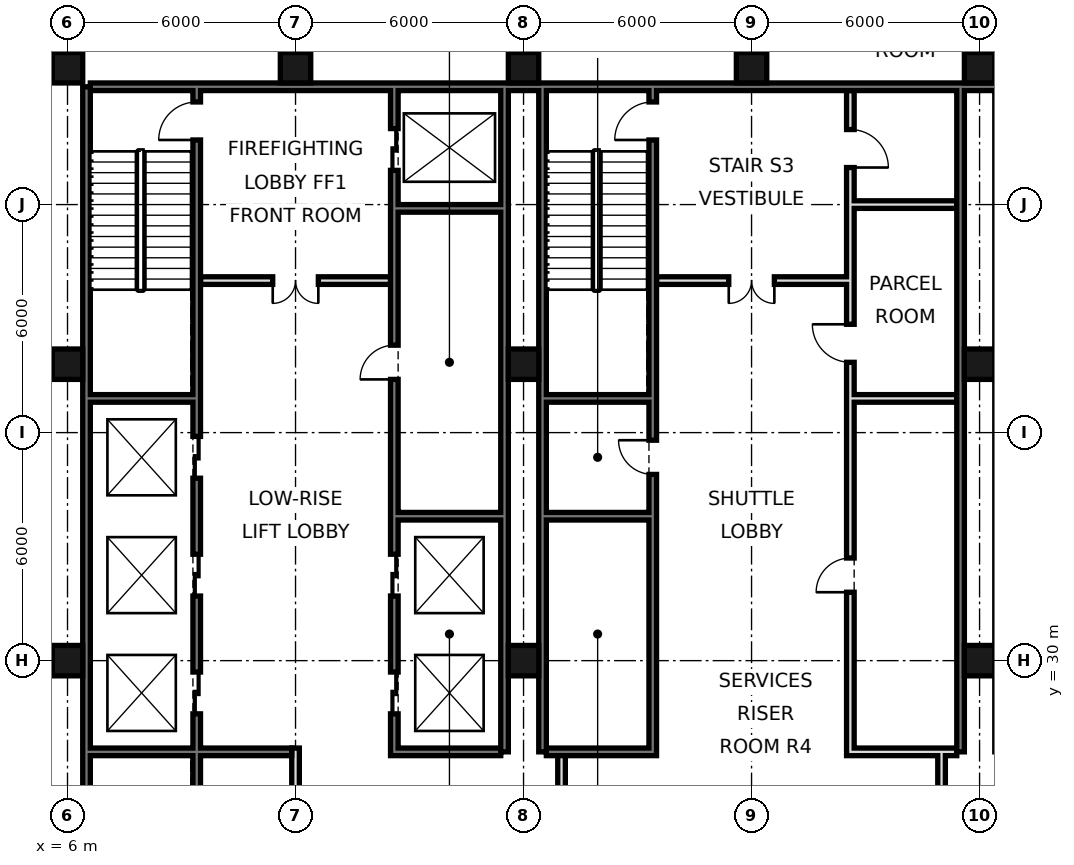
"""IFC4 building model, lengths in metres.
Left out: names, types, materials, properties, quantities, classifications, styles, units other than length and angle.
Written with IfcOpenShell. Run it as: python <this file> out.ifc"""

import sys

from ifc_helpers import new_model, si_unit, direction, frame, frame_2d, origin, origin_2d, place, context, subcontext, project, spatial, rectangle, hollow_rectangle, extrude, element, fill, save


model = new_model("IFC4")
c1 = context("Model", 3, precision=1e-05, world=origin(), true_north=direction((0.0, 1.0)))
c2 = subcontext(c1, "Body", "Model", "MODEL_VIEW")
j1 = project(units=[si_unit("LENGTHUNIT", "METRE"), si_unit("PLANEANGLEUNIT", "RADIAN")], contexts=[c1])
p1 = place(None, origin())
s1 = spatial("IfcSite", under=j1, at=p1, CompositionType="ELEMENT")
p2 = place(p1, origin())
s2 = spatial("IfcBuilding", under=s1, at=p2, CompositionType="ELEMENT")
p3 = place(p2, frame((0.0, 0.0, 20.4)))
s3 = spatial("IfcBuildingStorey", under=s2, at=p3, CompositionType="ELEMENT", Elevation=20.4)
for number, where, z_axis, x_axis in (
    (1, (6.0, 30.0, 0.0), (0.0, 0.0, 1.0), (1.0, 0.0, 0.0)),
    (2, (6.0, 37.8, 0.0), (0.0, 0.0, 1.0), (1.0, 0.0, 0.0)),
    (3, (6.0, 45.6, 0.0), (0.0, 0.0, 1.0), (1.0, 0.0, 0.0)),
    (4, (12.0, 45.6, 0.0), (0.0, 0.0, 1.0), (1.0, 0.0, 0.0)),
    (5, (18.0, 30.0, 0.0), (0.0, 0.0, 1.0), (1.0, 0.0, 0.0)),
    (6, (18.0, 37.8, 0.0), (0.0, 0.0, 1.0), (1.0, 0.0, 0.0)),
    (7, (18.0, 45.6, 0.0), (0.0, 0.0, 1.0), (1.0, 0.0, 0.0)),
    (8, (24.0, 45.6, 0.0), (0.0, 0.0, 1.0), (1.0, 0.0, 0.0)),
    (9, (30.0, 30.0, 0.0), (0.0, 0.0, 1.0), (1.0, 0.0, 0.0)),
    (10, (30.0, 37.8, 0.0), (0.0, 0.0, 1.0), (1.0, 0.0, 0.0)),
    (11, (30.0, 45.6, 0.0), (0.0, 0.0, 1.0), (1.0, 0.0, 0.0)),
):
    element("IfcColumn", number, at=place(p3, frame(where, z_axis=z_axis, x_axis=x_axis)), inside=s3, PredefinedType="COLUMN", context=c2, shape_type="SweptSolid", body=[
        extrude(hollow_rectangle(XDim=0.8, YDim=0.8, WallThickness=0.07, at=origin_2d()), origin(), (0.0, 0.0, 1.0), 4.8),
    ])
p4 = place(p3, frame((6.5, 21.6, 0.0), z_axis=(0.0, 0.0, 1.0), x_axis=(0.0, 1.0, 0.0)))
e12 = element("IfcWall", 12, at=p4, inside=s3, PredefinedType="SOLIDWALL", context=c2, shape_type="SweptSolid", body=[
    extrude(rectangle(XDim=23.5, YDim=0.2, at=frame_2d((11.75, 0.0))), origin(), (0.0, 0.0, 1.0), 4.4),
])
p5 = place(p3, frame((6.6, 45.1, 0.0), z_axis=(0.0, 0.0, 1.0), x_axis=(1.0, 0.0, 0.0)))
e13 = element("IfcWall", 13, at=p5, inside=s3, PredefinedType="SOLIDWALL", context=c2, shape_type="SweptSolid", body=[
    extrude(rectangle(XDim=34.8, YDim=0.2, at=frame_2d((17.4, 0.0))), origin(), (0.0, 0.0, 1.0), 4.4),
])
for number, where, z_axis, x_axis in (
    (14, (17.5, 27.6, 0.0), (0.0, 0.0, 1.0), (0.0, 1.0, 0.0)),
    (15, (18.5, 27.6, 0.0), (0.0, 0.0, 1.0), (0.0, 1.0, 0.0)),
    (16, (29.5, 27.6, 0.0), (0.0, 0.0, 1.0), (0.0, 1.0, 0.0)),
):
    element("IfcWall", number, at=place(p3, frame(where, z_axis=z_axis, x_axis=x_axis)), inside=s3, PredefinedType="SOLIDWALL", context=c2, shape_type="SweptSolid", body=[
        extrude(rectangle(XDim=17.5, YDim=0.2, at=frame_2d((8.75, 0.0))), origin(), (0.0, 0.0, 1.0), 4.4),
    ])
p6 = place(p3, frame((19.0, 21.6, 0.0), z_axis=(0.0, 0.0, 1.0), x_axis=(0.0, 1.0, 0.0)))
e17 = element("IfcWall", 17, at=p6, inside=s3, PredefinedType="PARTITIONING", context=c2, shape_type="SweptSolid", body=[
    extrude(rectangle(XDim=6.0, YDim=0.2, at=frame_2d((3.0, 0.0))), origin(), (0.0, 0.0, 1.0), 4.4),
])
p7 = place(p6, frame((2.1, 0.0, 0.0)))
e18 = element("IfcOpeningElement", 18, at=p7, cuts=e17, PredefinedType="OPENING", context=c2, shape_type="SweptSolid", body=[
    extrude(rectangle(XDim=1.8, YDim=2.1, at=frame_2d((0.9, 1.05))), frame((0.0, 0.11, 0.0), z_axis=(0.0, -1.0, 0.0), x_axis=(1.0, 0.0, 0.0)), (0.0, 0.0, 1.0), 0.22),
])
p8 = place(p3, frame((29.0, 21.6, 0.0), z_axis=(0.0, 0.0, 1.0), x_axis=(0.0, 1.0, 0.0)))
e19 = element("IfcWall", 19, at=p8, inside=s3, PredefinedType="PARTITIONING", context=c2, shape_type="SweptSolid", body=[
    extrude(rectangle(XDim=6.0, YDim=0.2, at=frame_2d((3.0, 0.0))), origin(), (0.0, 0.0, 1.0), 4.4),
])
p9 = place(p8, frame((2.1, 0.0, 0.0)))
e20 = element("IfcOpeningElement", 20, at=p9, cuts=e19, PredefinedType="OPENING", context=c2, shape_type="SweptSolid", body=[
    extrude(rectangle(XDim=1.8, YDim=2.1, at=frame_2d((0.9, 1.05))), frame((0.0, 0.11, 0.0), z_axis=(0.0, -1.0, 0.0), x_axis=(1.0, 0.0, 0.0)), (0.0, 0.0, 1.0), 0.22),
])
p10 = place(p3, frame((12.0, 21.6, 0.0), z_axis=(0.0, 0.0, 1.0), x_axis=(0.0, 1.0, 0.0)))
e21 = element("IfcWall", 21, at=p10, inside=s3, PredefinedType="PARTITIONING", context=c2, shape_type="SweptSolid", body=[
    extrude(rectangle(XDim=6.1, YDim=0.2, at=frame_2d((3.05, 0.0))), origin(), (0.0, 0.0, 1.0), 4.4),
])
p11 = place(p3, frame((14.6, 27.5, 0.0), z_axis=(0.0, 0.0, 1.0), x_axis=(0.0, 1.0, 0.0)))
e22 = element("IfcWall", 22, at=p11, inside=s3, PredefinedType="SOLIDWALL", context=c2, shape_type="SweptSolid", body=[
    extrude(rectangle(XDim=17.5, YDim=0.2, at=frame_2d((8.75, 0.0))), origin(), (0.0, 0.0, 1.0), 4.4),
])
p12 = place(p11, frame((1.1, 0.0, 0.0)))
e23 = element("IfcOpeningElement", 23, at=p12, cuts=e22, PredefinedType="OPENING", context=c2, shape_type="SweptSolid", body=[
    extrude(rectangle(XDim=1.1, YDim=2.1, at=frame_2d((0.55, 1.05))), frame((0.0, 0.11, 0.0), z_axis=(0.0, -1.0, 0.0), x_axis=(1.0, 0.0, 0.0)), (0.0, 0.0, 1.0), 0.22),
])
p13 = place(p11, frame((4.2, 0.0, 0.0)))
e24 = element("IfcOpeningElement", 24, at=p13, cuts=e22, PredefinedType="OPENING", context=c2, shape_type="SweptSolid", body=[
    extrude(rectangle(XDim=1.1, YDim=2.1, at=frame_2d((0.55, 1.05))), frame((0.0, 0.11, 0.0), z_axis=(0.0, -1.0, 0.0), x_axis=(1.0, 0.0, 0.0)), (0.0, 0.0, 1.0), 0.22),
])
p14 = place(p11, frame((15.4, 0.0, 0.0)))
e25 = element("IfcOpeningElement", 25, at=p14, cuts=e22, PredefinedType="OPENING", context=c2, shape_type="SweptSolid", body=[
    extrude(rectangle(XDim=1.1, YDim=2.1, at=frame_2d((0.55, 1.05))), frame((0.0, 0.11, 0.0), z_axis=(0.0, -1.0, 0.0), x_axis=(1.0, 0.0, 0.0)), (0.0, 0.0, 1.0), 0.22),
])
p15 = place(p11, frame((9.9, 0.0, 0.0)))
e26 = element("IfcOpeningElement", 26, at=p15, cuts=e22, PredefinedType="OPENING", context=c2, shape_type="SweptSolid", body=[
    extrude(rectangle(XDim=0.9, YDim=2.1, at=frame_2d((0.45, 1.05))), frame((0.0, 0.11, 0.0), z_axis=(0.0, -1.0, 0.0), x_axis=(1.0, 0.0, 0.0)), (0.0, 0.0, 1.0), 0.22),
])
p16 = place(p3, frame((21.4, 27.5, 0.0), z_axis=(0.0, 0.0, 1.0), x_axis=(0.0, 1.0, 0.0)))
e27 = element("IfcWall", 27, at=p16, inside=s3, PredefinedType="SOLIDWALL", context=c2, shape_type="SweptSolid", body=[
    extrude(rectangle(XDim=17.5, YDim=0.2, at=frame_2d((8.75, 0.0))), origin(), (0.0, 0.0, 1.0), 4.4),
])
p17 = place(p16, frame((16.2, 0.0, 0.0)))
e28 = element("IfcOpeningElement", 28, at=p17, cuts=e27, PredefinedType="OPENING", context=c2, shape_type="SweptSolid", body=[
    extrude(rectangle(XDim=1.0, YDim=2.1, at=frame_2d((0.5, 1.05))), frame((0.0, 0.11, 0.0), z_axis=(0.0, -1.0, 0.0), x_axis=(1.0, 0.0, 0.0)), (0.0, 0.0, 1.0), 0.22),
])
p18 = place(p16, frame((7.4, 0.0, 0.0)))
e29 = element("IfcOpeningElement", 29, at=p18, cuts=e27, PredefinedType="OPENING", context=c2, shape_type="SweptSolid", body=[
    extrude(rectangle(XDim=0.9, YDim=2.1, at=frame_2d((0.45, 1.05))), frame((0.0, 0.11, 0.0), z_axis=(0.0, -1.0, 0.0), x_axis=(1.0, 0.0, 0.0)), (0.0, 0.0, 1.0), 0.22),
])
p19 = place(p3, frame((26.6, 27.5, 0.0), z_axis=(0.0, 0.0, 1.0), x_axis=(0.0, 1.0, 0.0)))
e30 = element("IfcWall", 30, at=p19, inside=s3, PredefinedType="SOLIDWALL", context=c2, shape_type="SweptSolid", body=[
    extrude(rectangle(XDim=17.5, YDim=0.2, at=frame_2d((8.75, 0.0))), origin(), (0.0, 0.0, 1.0), 4.4),
])
p20 = place(p19, frame((4.3, 0.0, 0.0)))
e31 = element("IfcOpeningElement", 31, at=p20, cuts=e30, PredefinedType="OPENING", context=c2, shape_type="SweptSolid", body=[
    extrude(rectangle(XDim=0.9, YDim=2.1, at=frame_2d((0.45, 1.05))), frame((0.0, 0.11, 0.0), z_axis=(0.0, -1.0, 0.0), x_axis=(1.0, 0.0, 0.0)), (0.0, 0.0, 1.0), 0.22),
])
p21 = place(p19, frame((10.35, 0.0, 0.0)))
e32 = element("IfcOpeningElement", 32, at=p21, cuts=e30, PredefinedType="OPENING", context=c2, shape_type="SweptSolid", body=[
    extrude(rectangle(XDim=1.0, YDim=2.1, at=frame_2d((0.5, 1.05))), frame((0.0, 0.11, 0.0), z_axis=(0.0, -1.0, 0.0), x_axis=(1.0, 0.0, 0.0)), (0.0, 0.0, 1.0), 0.22),
])
p22 = place(p19, frame((15.475, 0.0, 0.0)))
e33 = element("IfcOpeningElement", 33, at=p22, cuts=e30, PredefinedType="OPENING", context=c2, shape_type="SweptSolid", body=[
    extrude(rectangle(XDim=1.0, YDim=2.1, at=frame_2d((0.5, 1.05))), frame((0.0, 0.11, 0.0), z_axis=(0.0, -1.0, 0.0), x_axis=(1.0, 0.0, 0.0)), (0.0, 0.0, 1.0), 0.22),
])
p23 = place(p3, frame((9.4, 21.6, 0.0), z_axis=(0.0, 0.0, 1.0), x_axis=(0.0, 1.0, 0.0)))
e34 = element("IfcWall", 34, at=p23, inside=s3, PredefinedType="SOLIDWALL", context=c2, shape_type="SweptSolid", body=[
    extrude(rectangle(XDim=23.4, YDim=0.2, at=frame_2d((11.7, 0.0))), origin(), (0.0, 0.0, 1.0), 4.4),
])
p24 = place(p23, frame((7.0, 0.0, 0.0)))
e35 = element("IfcOpeningElement", 35, at=p24, cuts=e34, PredefinedType="OPENING", context=c2, shape_type="SweptSolid", body=[
    extrude(rectangle(XDim=1.1, YDim=2.1, at=frame_2d((0.55, 1.05))), frame((0.0, 0.11, 0.0), z_axis=(0.0, -1.0, 0.0), x_axis=(1.0, 0.0, 0.0)), (0.0, 0.0, 1.0), 0.22),
])
p25 = place(p23, frame((10.1, 0.0, 0.0)))
e36 = element("IfcOpeningElement", 36, at=p25, cuts=e34, PredefinedType="OPENING", context=c2, shape_type="SweptSolid", body=[
    extrude(rectangle(XDim=1.1, YDim=2.1, at=frame_2d((0.55, 1.05))), frame((0.0, 0.11, 0.0), z_axis=(0.0, -1.0, 0.0), x_axis=(1.0, 0.0, 0.0)), (0.0, 0.0, 1.0), 0.22),
])
p26 = place(p23, frame((13.2, 0.0, 0.0)))
e37 = element("IfcOpeningElement", 37, at=p26, cuts=e34, PredefinedType="OPENING", context=c2, shape_type="SweptSolid", body=[
    extrude(rectangle(XDim=1.1, YDim=2.1, at=frame_2d((0.55, 1.05))), frame((0.0, 0.11, 0.0), z_axis=(0.0, -1.0, 0.0), x_axis=(1.0, 0.0, 0.0)), (0.0, 0.0, 1.0), 0.22),
])
p27 = place(p23, frame((22.1, 0.0, 0.0)))
e38 = element("IfcOpeningElement", 38, at=p27, cuts=e34, PredefinedType="OPENING", context=c2, shape_type="SweptSolid", body=[
    extrude(rectangle(XDim=1.0, YDim=2.1, at=frame_2d((0.5, 1.05))), frame((0.0, 0.11, 0.0), z_axis=(0.0, -1.0, 0.0), x_axis=(1.0, 0.0, 0.0)), (0.0, 0.0, 1.0), 0.22),
])
p28 = place(p23, frame((0.175, 0.0, 0.0)))
e39 = element("IfcOpeningElement", 39, at=p28, cuts=e34, PredefinedType="OPENING", context=c2, shape_type="SweptSolid", body=[
    extrude(rectangle(XDim=0.9, YDim=2.1, at=frame_2d((0.45, 1.05))), frame((0.0, 0.11, 0.0), z_axis=(0.0, -1.0, 0.0), x_axis=(1.0, 0.0, 0.0)), (0.0, 0.0, 1.0), 0.22),
])
for number, where, z_axis, x_axis in (
    (40, (14.7, 27.6, 0.0), (0.0, 0.0, 1.0), (1.0, 0.0, 0.0)),
    (41, (18.6, 27.6, 0.0), (0.0, 0.0, 1.0), (1.0, 0.0, 0.0)),
    (42, (26.7, 27.6, 0.0), (0.0, 0.0, 1.0), (1.0, 0.0, 0.0)),
):
    element("IfcWall", number, at=place(p3, frame(where, z_axis=z_axis, x_axis=x_axis)), inside=s3, PredefinedType="SOLIDWALL", context=c2, shape_type="SweptSolid", body=[
        extrude(rectangle(XDim=2.7, YDim=0.2, at=frame_2d((1.35, 0.0))), origin(), (0.0, 0.0, 1.0), 4.4),
    ])
p29 = place(p3, frame((6.6, 27.6, 0.0), z_axis=(0.0, 0.0, 1.0), x_axis=(1.0, 0.0, 0.0)))
e43 = element("IfcWall", 43, at=p29, inside=s3, PredefinedType="SOLIDWALL", context=c2, shape_type="SweptSolid", body=[
    extrude(rectangle(XDim=5.3, YDim=0.2, at=frame_2d((2.65, 0.0))), origin(), (0.0, 0.0, 1.0), 4.4),
])
for number, where, z_axis, x_axis in (
    (44, (14.7, 33.8, 0.0), (0.0, 0.0, 1.0), (1.0, 0.0, 0.0)),
    (45, (18.6, 33.8, 0.0), (0.0, 0.0, 1.0), (1.0, 0.0, 0.0)),
    (46, (18.6, 36.9, 0.0), (0.0, 0.0, 1.0), (1.0, 0.0, 0.0)),
    (47, (26.7, 36.9, 0.0), (0.0, 0.0, 1.0), (1.0, 0.0, 0.0)),
    (48, (6.6, 36.9, 0.0), (0.0, 0.0, 1.0), (1.0, 0.0, 0.0)),
):
    element("IfcWall", number, at=place(p3, frame(where, z_axis=z_axis, x_axis=x_axis)), inside=s3, PredefinedType="SOLIDWALL", context=c2, shape_type="SweptSolid", body=[
        extrude(rectangle(XDim=2.7, YDim=0.2, at=frame_2d((1.35, 0.0))), origin(), (0.0, 0.0, 1.0), 4.4),
    ])
p30 = place(p3, frame((21.5, 40.0, 0.0), z_axis=(0.0, 0.0, 1.0), x_axis=(1.0, 0.0, 0.0)))
e49 = element("IfcWall", 49, at=p30, inside=s3, PredefinedType="PARTITIONING", context=c2, shape_type="SweptSolid", body=[
    extrude(rectangle(XDim=5.0, YDim=0.2, at=frame_2d((2.5, 0.0))), origin(), (0.0, 0.0, 1.0), 4.4),
])
p31 = place(p30, frame((1.9, 0.0, 0.0)))
e50 = element("IfcOpeningElement", 50, at=p31, cuts=e49, PredefinedType="OPENING", context=c2, shape_type="SweptSolid", body=[
    extrude(rectangle(XDim=1.2, YDim=2.1, at=frame_2d((0.6, 1.05))), frame((0.0, 0.11, 0.0), z_axis=(0.0, -1.0, 0.0), x_axis=(1.0, 0.0, 0.0)), (0.0, 0.0, 1.0), 0.22),
])
p32 = place(p3, frame((9.5, 40.0, 0.0), z_axis=(0.0, 0.0, 1.0), x_axis=(1.0, 0.0, 0.0)))
e51 = element("IfcWall", 51, at=p32, inside=s3, PredefinedType="PARTITIONING", context=c2, shape_type="SweptSolid", body=[
    extrude(rectangle(XDim=5.0, YDim=0.2, at=frame_2d((2.5, 0.0))), origin(), (0.0, 0.0, 1.0), 4.4),
])
p33 = place(p32, frame((1.9, 0.0, 0.0)))
e52 = element("IfcOpeningElement", 52, at=p33, cuts=e51, PredefinedType="OPENING", context=c2, shape_type="SweptSolid", body=[
    extrude(rectangle(XDim=1.2, YDim=2.1, at=frame_2d((0.6, 1.05))), frame((0.0, 0.11, 0.0), z_axis=(0.0, -1.0, 0.0), x_axis=(1.0, 0.0, 0.0)), (0.0, 0.0, 1.0), 0.22),
])
p34 = place(p3, frame((14.7, 41.9, 0.0), z_axis=(0.0, 0.0, 1.0), x_axis=(1.0, 0.0, 0.0)))
e53 = element("IfcWall", 53, at=p34, inside=s3, PredefinedType="SOLIDWALL", context=c2, shape_type="SweptSolid", body=[
    extrude(rectangle(XDim=2.7, YDim=0.2, at=frame_2d((1.35, 0.0))), origin(), (0.0, 0.0, 1.0), 4.4),
])
p35 = place(p3, frame((26.7, 42.0, 0.0), z_axis=(0.0, 0.0, 1.0), x_axis=(1.0, 0.0, 0.0)))
e54 = element("IfcWall", 54, at=p35, inside=s3, PredefinedType="PARTITIONING", context=c2, shape_type="SweptSolid", body=[
    extrude(rectangle(XDim=2.7, YDim=0.2, at=frame_2d((1.35, 0.0))), origin(), (0.0, 0.0, 1.0), 4.4),
])
p36 = place(p33, frame((1.2, 0.0, 0.0), z_axis=(0.0, 0.0, 1.0), x_axis=(-1.0, 0.0, 0.0)))
e55 = element("IfcDoor", 55, at=p36, inside=s3, OperationType="DOUBLE_DOOR_SINGLE_SWING", PredefinedType="DOOR", context=c2, shape_type="SweptSolid", body=[
    extrude(rectangle(XDim=1.2, YDim=2.1, at=frame_2d((0.6, 1.05))), frame((0.0, 0.025, 0.0), z_axis=(0.0, -1.0, 0.0), x_axis=(1.0, 0.0, 0.0)), (0.0, 0.0, 1.0), 0.05),
])
fill(e52, e55)
p37 = place(p31, frame((1.2, 0.0, 0.0), z_axis=(0.0, 0.0, 1.0), x_axis=(-1.0, 0.0, 0.0)))
e56 = element("IfcDoor", 56, at=p37, inside=s3, OperationType="DOUBLE_DOOR_SINGLE_SWING", PredefinedType="DOOR", context=c2, shape_type="SweptSolid", body=[
    extrude(rectangle(XDim=1.2, YDim=2.1, at=frame_2d((0.6, 1.05))), frame((0.0, 0.025, 0.0), z_axis=(0.0, -1.0, 0.0), x_axis=(1.0, 0.0, 0.0)), (0.0, 0.0, 1.0), 0.05),
])
fill(e50, e56)
p38 = place(p12, origin())
e57 = element("IfcDoor", 57, at=p38, inside=s3, OperationType="DOUBLE_DOOR_SLIDING", PredefinedType="DOOR", context=c2, shape_type="SweptSolid", body=[
    extrude(rectangle(XDim=1.1, YDim=2.1, at=frame_2d((0.55, 1.05))), frame((0.0, 0.025, 0.0), z_axis=(0.0, -1.0, 0.0), x_axis=(1.0, 0.0, 0.0)), (0.0, 0.0, 1.0), 0.05),
])
fill(e23, e57)
p39 = place(p13, origin())
e58 = element("IfcDoor", 58, at=p39, inside=s3, OperationType="DOUBLE_DOOR_SLIDING", PredefinedType="DOOR", context=c2, shape_type="SweptSolid", body=[
    extrude(rectangle(XDim=1.1, YDim=2.1, at=frame_2d((0.55, 1.05))), frame((0.0, 0.025, 0.0), z_axis=(0.0, -1.0, 0.0), x_axis=(1.0, 0.0, 0.0)), (0.0, 0.0, 1.0), 0.05),
])
fill(e24, e58)
p40 = place(p14, origin())
e59 = element("IfcDoor", 59, at=p40, inside=s3, OperationType="DOUBLE_DOOR_SLIDING", PredefinedType="DOOR", context=c2, shape_type="SweptSolid", body=[
    extrude(rectangle(XDim=1.1, YDim=2.1, at=frame_2d((0.55, 1.05))), frame((0.0, 0.025, 0.0), z_axis=(0.0, -1.0, 0.0), x_axis=(1.0, 0.0, 0.0)), (0.0, 0.0, 1.0), 0.05),
])
fill(e25, e59)
p41 = place(p24, origin())
e60 = element("IfcDoor", 60, at=p41, inside=s3, OperationType="DOUBLE_DOOR_SLIDING", PredefinedType="DOOR", context=c2, shape_type="SweptSolid", body=[
    extrude(rectangle(XDim=1.1, YDim=2.1, at=frame_2d((0.55, 1.05))), frame((0.0, 0.025, 0.0), z_axis=(0.0, -1.0, 0.0), x_axis=(1.0, 0.0, 0.0)), (0.0, 0.0, 1.0), 0.05),
])
fill(e35, e60)
p42 = place(p25, origin())
e61 = element("IfcDoor", 61, at=p42, inside=s3, OperationType="DOUBLE_DOOR_SLIDING", PredefinedType="DOOR", context=c2, shape_type="SweptSolid", body=[
    extrude(rectangle(XDim=1.1, YDim=2.1, at=frame_2d((0.55, 1.05))), frame((0.0, 0.025, 0.0), z_axis=(0.0, -1.0, 0.0), x_axis=(1.0, 0.0, 0.0)), (0.0, 0.0, 1.0), 0.05),
])
fill(e36, e61)
p43 = place(p26, origin())
e62 = element("IfcDoor", 62, at=p43, inside=s3, OperationType="DOUBLE_DOOR_SLIDING", PredefinedType="DOOR", context=c2, shape_type="SweptSolid", body=[
    extrude(rectangle(XDim=1.1, YDim=2.1, at=frame_2d((0.55, 1.05))), frame((0.0, 0.025, 0.0), z_axis=(0.0, -1.0, 0.0), x_axis=(1.0, 0.0, 0.0)), (0.0, 0.0, 1.0), 0.05),
])
fill(e37, e62)
p44 = place(p27, origin())
e63 = element("IfcDoor", 63, at=p44, inside=s3, OperationType="SINGLE_SWING_LEFT", PredefinedType="DOOR", context=c2, shape_type="SweptSolid", body=[
    extrude(rectangle(XDim=1.0, YDim=2.1, at=frame_2d((0.5, 1.05))), frame((0.0, 0.025, 0.0), z_axis=(0.0, -1.0, 0.0), x_axis=(1.0, 0.0, 0.0)), (0.0, 0.0, 1.0), 0.05),
])
fill(e38, e63)
p45 = place(p17, origin())
e64 = element("IfcDoor", 64, at=p45, inside=s3, OperationType="SINGLE_SWING_LEFT", PredefinedType="DOOR", context=c2, shape_type="SweptSolid", body=[
    extrude(rectangle(XDim=1.0, YDim=2.1, at=frame_2d((0.5, 1.05))), frame((0.0, 0.025, 0.0), z_axis=(0.0, -1.0, 0.0), x_axis=(1.0, 0.0, 0.0)), (0.0, 0.0, 1.0), 0.05),
])
fill(e28, e64)
p46 = place(p15, origin())
e65 = element("IfcDoor", 65, at=p46, inside=s3, OperationType="SINGLE_SWING_LEFT", PredefinedType="DOOR", context=c2, shape_type="SweptSolid", body=[
    extrude(rectangle(XDim=0.9, YDim=2.1, at=frame_2d((0.45, 1.05))), frame((0.0, 0.025, 0.0), z_axis=(0.0, -1.0, 0.0), x_axis=(1.0, 0.0, 0.0)), (0.0, 0.0, 1.0), 0.05),
])
fill(e26, e65)
p47 = place(p18, frame((0.9, 0.0, 0.0), z_axis=(0.0, 0.0, 1.0), x_axis=(-1.0, 0.0, 0.0)))
e66 = element("IfcDoor", 66, at=p47, inside=s3, OperationType="SINGLE_SWING_LEFT", PredefinedType="DOOR", context=c2, shape_type="SweptSolid", body=[
    extrude(rectangle(XDim=0.9, YDim=2.1, at=frame_2d((0.45, 1.05))), frame((0.0, 0.025, 0.0), z_axis=(0.0, -1.0, 0.0), x_axis=(1.0, 0.0, 0.0)), (0.0, 0.0, 1.0), 0.05),
])
fill(e29, e66)
p48 = place(p20, origin())
e67 = element("IfcDoor", 67, at=p48, inside=s3, OperationType="SINGLE_SWING_LEFT", PredefinedType="DOOR", context=c2, shape_type="SweptSolid", body=[
    extrude(rectangle(XDim=0.9, YDim=2.1, at=frame_2d((0.45, 1.05))), frame((0.0, 0.025, 0.0), z_axis=(0.0, -1.0, 0.0), x_axis=(1.0, 0.0, 0.0)), (0.0, 0.0, 1.0), 0.05),
])
fill(e31, e67)
p49 = place(p21, frame((1.0, 0.0, 0.0), z_axis=(0.0, 0.0, 1.0), x_axis=(-1.0, 0.0, 0.0)))
e68 = element("IfcDoor", 68, at=p49, inside=s3, OperationType="SINGLE_SWING_LEFT", PredefinedType="DOOR", context=c2, shape_type="SweptSolid", body=[
    extrude(rectangle(XDim=1.0, YDim=2.1, at=frame_2d((0.5, 1.05))), frame((0.0, 0.025, 0.0), z_axis=(0.0, -1.0, 0.0), x_axis=(1.0, 0.0, 0.0)), (0.0, 0.0, 1.0), 0.05),
])
fill(e32, e68)
p50 = place(p22, frame((1.0, 0.0, 0.0), z_axis=(0.0, 0.0, 1.0), x_axis=(-1.0, 0.0, 0.0)))
e69 = element("IfcDoor", 69, at=p50, inside=s3, OperationType="SINGLE_SWING_RIGHT", PredefinedType="DOOR", context=c2, shape_type="SweptSolid", body=[
    extrude(rectangle(XDim=1.0, YDim=2.1, at=frame_2d((0.5, 1.05))), frame((0.0, 0.025, 0.0), z_axis=(0.0, -1.0, 0.0), x_axis=(1.0, 0.0, 0.0)), (0.0, 0.0, 1.0), 0.05),
])
fill(e33, e69)
save(model, sys.argv[1])
